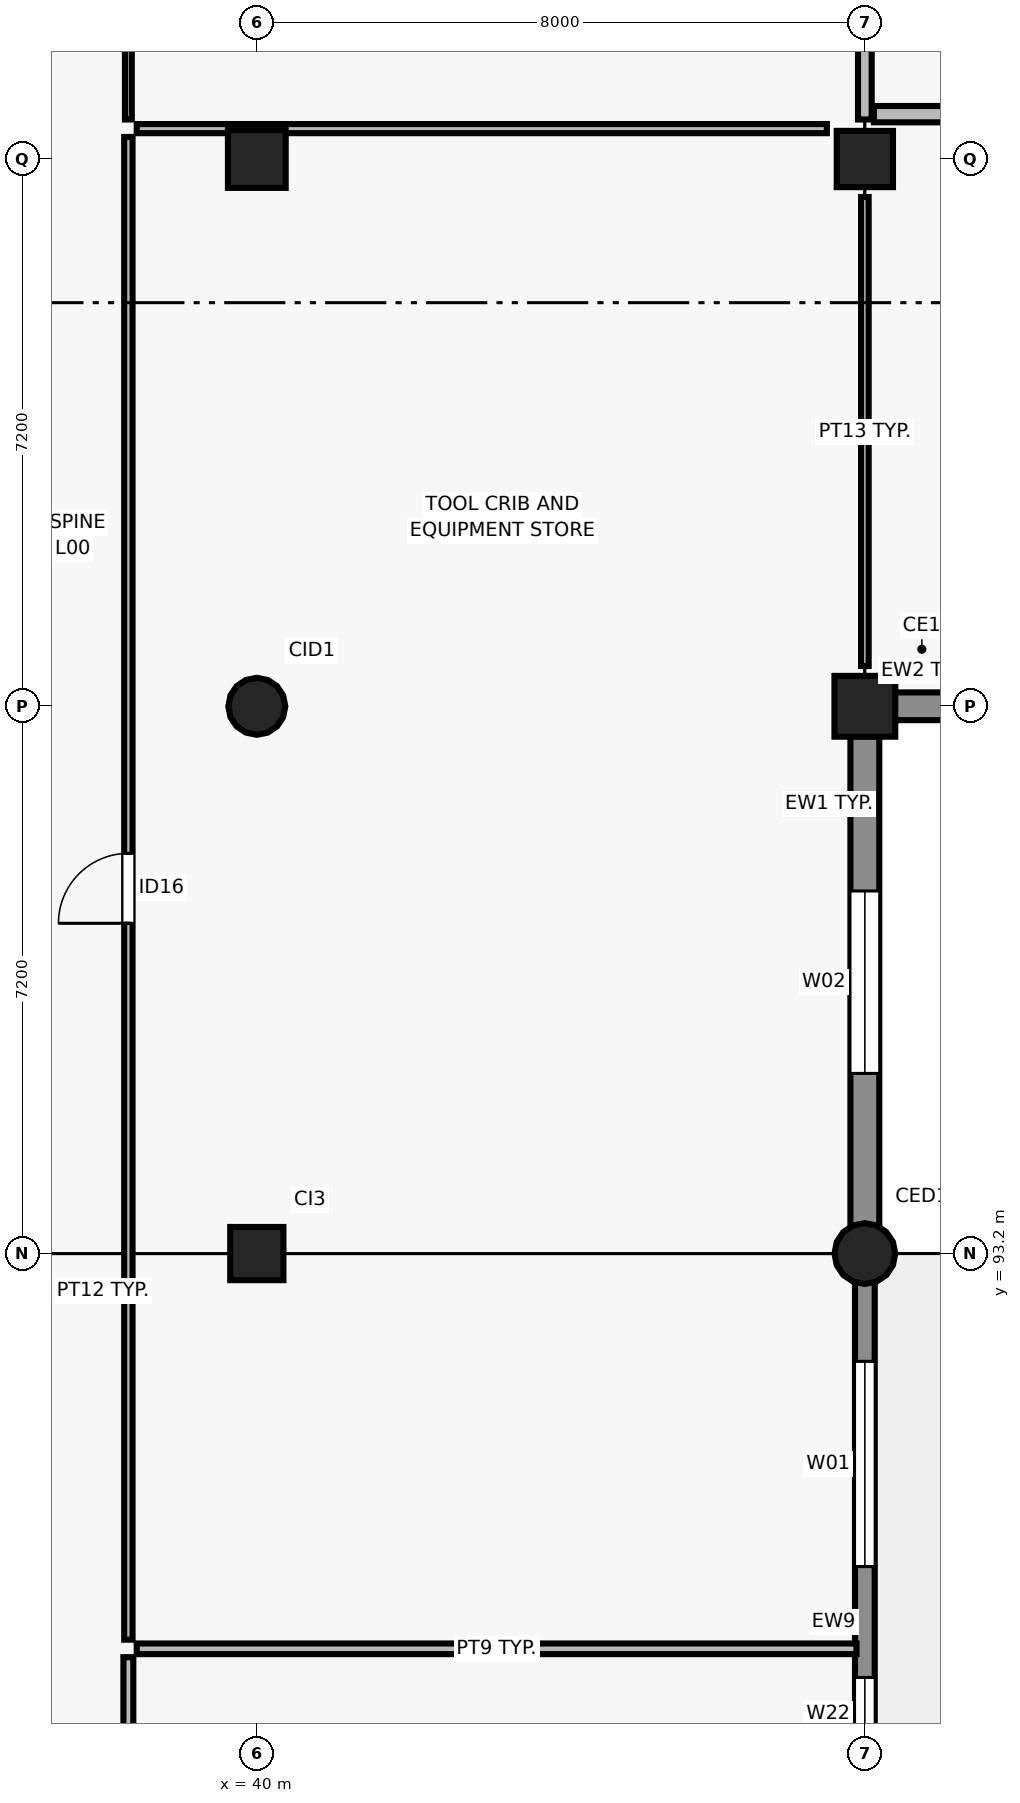
"""IFC4 building model, lengths in metres.
Left out: names, types, materials, properties, quantities, classifications, styles, units other than length and angle.
Written with IfcOpenShell. Run it as: python <this file> out.ifc"""

import sys

from ifc_helpers import new_model, si_unit, direction, frame, frame_2d, origin, origin_2d, place, context, subcontext, project, spatial, rectangle, circle, extrude, element, fill, save


model = new_model("IFC4")
c1 = context("Model", 3, precision=1e-05, world=origin(), true_north=direction((0.0, 1.0)))
c2 = subcontext(c1, "Body", "Model", "MODEL_VIEW")
j1 = project(units=[si_unit("LENGTHUNIT", "METRE"), si_unit("PLANEANGLEUNIT", "RADIAN")], contexts=[c1])
p1 = place(None, origin())
s1 = spatial("IfcSite", under=j1, at=p1, CompositionType="ELEMENT")
p2 = place(p1, origin())
s2 = spatial("IfcBuilding", under=s1, at=p2, CompositionType="ELEMENT")
p3 = place(p2, origin())
s3 = spatial("IfcBuildingStorey", under=s2, at=p3, CompositionType="ELEMENT", Elevation=0.0)
p4 = place(p3, frame((40.0, 93.2, 0.0), z_axis=(0.0, 0.0, 1.0), x_axis=(1.0, 0.0, 0.0)))
e1 = element("IfcColumn", 1, at=p4, inside=s3, PredefinedType="COLUMN", context=c2, shape_type="SweptSolid", body=[
    extrude(rectangle(XDim=0.7, YDim=0.7, at=origin_2d()), origin(), (0.0, 0.0, 1.0), 4.5),
])
p5 = place(p3, frame((40.0, 100.4, 0.0), z_axis=(0.0, 0.0, 1.0), x_axis=(1.0, 0.0, 0.0)))
e2 = element("IfcColumn", 2, at=p5, inside=s3, PredefinedType="COLUMN", context=c2, shape_type="SweptSolid", body=[
    extrude(circle(Radius=0.375, at=origin_2d()), origin(), (0.0, 0.0, 1.0), 4.5),
])
p6 = place(p3, frame((40.0, 107.6, 0.0), z_axis=(0.0, 0.0, 1.0), x_axis=(1.0, 0.0, 0.0)))
e3 = element("IfcColumn", 3, at=p6, inside=s3, PredefinedType="COLUMN", context=c2, shape_type="SweptSolid", body=[
    extrude(rectangle(XDim=0.76, YDim=0.76, at=origin_2d()), origin(), (0.0, 0.0, 1.0), 4.5),
])
p7 = place(p3, frame((48.0, 93.2, 0.0), z_axis=(0.0, 0.0, 1.0), x_axis=(1.0, 0.0, 0.0)))
e4 = element("IfcColumn", 4, at=p7, inside=s3, PredefinedType="COLUMN", context=c2, shape_type="SweptSolid", body=[
    extrude(circle(Radius=0.4, at=origin_2d()), origin(), (0.0, 0.0, 1.0), 4.5),
])
p8 = place(p3, frame((48.0, 100.4, 0.0), z_axis=(0.0, 0.0, 1.0), x_axis=(1.0, 0.0, 0.0)))
e5 = element("IfcColumn", 5, at=p8, inside=s3, PredefinedType="COLUMN", context=c2, shape_type="SweptSolid", body=[
    extrude(rectangle(XDim=0.8, YDim=0.8, at=origin_2d()), origin(), (0.0, 0.0, 1.0), 4.5),
])
p9 = place(p3, frame((48.0, 107.6, 0.0), z_axis=(0.0, 0.0, 1.0), x_axis=(1.0, 0.0, 0.0)))
e6 = element("IfcColumn", 6, at=p9, inside=s3, PredefinedType="COLUMN", context=c2, shape_type="SweptSolid", body=[
    extrude(rectangle(XDim=0.74, YDim=0.74, at=origin_2d()), origin(), (0.0, 0.0, 1.0), 4.5),
])
p10 = place(p3, frame((48.0, 86.295, 0.0), z_axis=(0.0, 0.0, 1.0), x_axis=(0.0, 1.0, 0.0)))
e7 = element("IfcWall", 7, at=p10, inside=s3, PredefinedType="SOLIDWALL", context=c2, shape_type="SweptSolid", body=[
    extrude(rectangle(XDim=6.569, YDim=0.26, at=frame_2d((3.285, 0.0))), origin(), (0.0, 0.0, 1.0), 3.6),
])
p11 = place(p10, frame((0.378, 0.0, 0.9)))
e8 = element("IfcOpeningElement", 8, at=p11, cuts=e7, PredefinedType="OPENING", context=c2, shape_type="SweptSolid", body=[
    extrude(rectangle(XDim=0.95, YDim=1.25, at=frame_2d((0.475, 0.625))), frame((0.0, 0.14, 0.0), z_axis=(0.0, -1.0, 0.0), x_axis=(1.0, 0.0, 0.0)), (0.0, 0.0, 1.0), 0.28),
])
p12 = place(p10, frame((2.787, 0.0, 0.9)))
e9 = element("IfcOpeningElement", 9, at=p12, cuts=e7, PredefinedType="OPENING", context=c2, shape_type="SweptSolid", body=[
    extrude(rectangle(XDim=2.7, YDim=1.8, at=frame_2d((1.35, 0.9))), frame((0.0, 0.14, 0.0), z_axis=(0.0, -1.0, 0.0), x_axis=(1.0, 0.0, 0.0)), (0.0, 0.0, 1.0), 0.28),
])
p13 = place(p3, frame((48.0, 93.536, 0.0), z_axis=(0.0, 0.0, 1.0), x_axis=(0.0, 1.0, 0.0)))
e10 = element("IfcWall", 10, at=p13, inside=s3, PredefinedType="SOLIDWALL", context=c2, shape_type="SweptSolid", body=[
    extrude(rectangle(XDim=6.469, YDim=0.38, at=frame_2d((3.234, 0.0))), origin(), (0.0, 0.0, 1.0), 3.64),
])
p14 = place(p13, frame((2.034, 0.0, 0.9)))
e11 = element("IfcOpeningElement", 11, at=p14, cuts=e10, PredefinedType="OPENING", context=c2, shape_type="SweptSolid", body=[
    extrude(rectangle(XDim=2.4, YDim=1.8, at=frame_2d((1.2, 0.9))), frame((0.0, 0.2, 0.0), z_axis=(0.0, -1.0, 0.0), x_axis=(1.0, 0.0, 0.0)), (0.0, 0.0, 1.0), 0.4),
])
p15 = place(p3, frame((48.395, 100.4, 0.0), z_axis=(0.0, 0.0, 1.0), x_axis=(1.0, 0.0, 0.0)))
e12 = element("IfcWall", 12, at=p15, inside=s3, PredefinedType="SOLIDWALL", context=c2, shape_type="SweptSolid", body=[
    extrude(rectangle(XDim=7.21, YDim=0.365, at=frame_2d((3.605, 0.0))), origin(), (0.0, 0.0, 1.0), 3.54),
])
p16 = place(p15, frame((1.043, 0.0, 0.9)))
e13 = element("IfcOpeningElement", 13, at=p16, cuts=e12, PredefinedType="OPENING", context=c2, shape_type="SweptSolid", body=[
    extrude(rectangle(XDim=2.2, YDim=1.8, at=frame_2d((1.1, 0.9))), frame((0.0, 0.192, 0.0), z_axis=(0.0, -1.0, 0.0), x_axis=(1.0, 0.0, 0.0)), (0.0, 0.0, 1.0), 0.385),
])
p17 = place(p15, frame((3.967, 0.0, 0.9)))
e14 = element("IfcOpeningElement", 14, at=p17, cuts=e12, PredefinedType="OPENING", context=c2, shape_type="SweptSolid", body=[
    extrude(rectangle(XDim=2.2, YDim=1.8, at=frame_2d((1.1, 0.9))), frame((0.0, 0.192, 0.0), z_axis=(0.0, -1.0, 0.0), x_axis=(1.0, 0.0, 0.0)), (0.0, 0.0, 1.0), 0.385),
])
p18 = place(p3, frame((38.42, 88.0, 0.0), z_axis=(0.0, 0.0, 1.0), x_axis=(1.0, 0.0, 0.0)))
e15 = element("IfcWall", 15, at=p18, inside=s3, PredefinedType="PARTITIONING", context=c2, shape_type="SweptSolid", body=[
    extrude(rectangle(XDim=9.47, YDim=0.14, at=frame_2d((4.735, 0.0))), origin(), (0.0, 0.0, 1.0), 4.2),
])
p19 = place(p3, frame((38.31, 68.12, 0.0), z_axis=(0.0, 0.0, 1.0), x_axis=(0.0, 1.0, 0.0)))
e16 = element("IfcWall", 16, at=p19, inside=s3, PredefinedType="PARTITIONING", context=c2, shape_type="SweptSolid", body=[
    extrude(rectangle(XDim=19.77, YDim=0.13, at=frame_2d((9.885, 0.0))), origin(), (0.0, 0.0, 1.0), 4.2),
])
p20 = place(p19, frame((9.06, 0.0, 0.0)))
e17 = element("IfcOpeningElement", 17, at=p20, cuts=e16, PredefinedType="OPENING", context=c2, shape_type="SweptSolid", body=[
    extrude(rectangle(XDim=1.65, YDim=2.3, at=frame_2d((0.825, 1.15))), frame((0.0, 0.075, 0.0), z_axis=(0.0, -1.0, 0.0), x_axis=(1.0, 0.0, 0.0)), (0.0, 0.0, 1.0), 0.15),
])
p21 = place(p3, frame((38.42, 108.0, 0.0), z_axis=(0.0, 0.0, 1.0), x_axis=(1.0, 0.0, 0.0)))
e18 = element("IfcWall", 18, at=p21, inside=s3, PredefinedType="PARTITIONING", context=c2, shape_type="SweptSolid", body=[
    extrude(rectangle(XDim=9.08, YDim=0.12, at=frame_2d((4.54, 0.0))), origin(), (0.0, 0.0, 1.0), 4.2),
])
p22 = place(p3, frame((38.31, 88.12, 0.0), z_axis=(0.0, 0.0, 1.0), x_axis=(0.0, 1.0, 0.0)))
e19 = element("IfcWall", 19, at=p22, inside=s3, PredefinedType="PARTITIONING", context=c2, shape_type="SweptSolid", body=[
    extrude(rectangle(XDim=19.77, YDim=0.11, at=frame_2d((9.885, 0.0))), origin(), (0.0, 0.0, 1.0), 4.2),
])
p23 = place(p22, frame((9.425, 0.0, 0.0)))
e20 = element("IfcOpeningElement", 20, at=p23, cuts=e19, PredefinedType="OPENING", context=c2, shape_type="SweptSolid", body=[
    extrude(rectangle(XDim=0.92, YDim=2.1, at=frame_2d((0.46, 1.05))), frame((0.0, 0.065, 0.0), z_axis=(0.0, -1.0, 0.0), x_axis=(1.0, 0.0, 0.0)), (0.0, 0.0, 1.0), 0.13),
])
p24 = place(p3, frame((48.0, 100.93, 0.0), z_axis=(0.0, 0.0, 1.0), x_axis=(0.0, 1.0, 0.0)))
e21 = element("IfcWall", 21, at=p24, inside=s3, PredefinedType="PARTITIONING", context=c2, shape_type="SweptSolid", body=[
    extrude(rectangle(XDim=6.17, YDim=0.1, at=frame_2d((3.085, 0.0))), origin(), (0.0, 0.0, 1.0), 3.74),
])
p25 = place(p3, frame((38.31, 108.12, 0.0), z_axis=(0.0, 0.0, 1.0), x_axis=(0.0, 1.0, 0.0)))
e22 = element("IfcWall", 22, at=p25, inside=s3, PredefinedType="PARTITIONING", context=c2, shape_type="SweptSolid", body=[
    extrude(rectangle(XDim=13.77, YDim=0.09, at=frame_2d((6.885, 0.0))), origin(), (0.0, 0.0, 1.0), 4.2),
])
p26 = place(p25, frame((6.06, 0.0, 0.0)))
e23 = element("IfcOpeningElement", 23, at=p26, cuts=e22, PredefinedType="OPENING", context=c2, shape_type="SweptSolid", body=[
    extrude(rectangle(XDim=1.65, YDim=2.3, at=frame_2d((0.825, 1.15))), frame((0.0, 0.055, 0.0), z_axis=(0.0, -1.0, 0.0), x_axis=(1.0, 0.0, 0.0)), (0.0, 0.0, 1.0), 0.11),
])
p27 = place(p3, frame((48.0, 108.12, 0.0), z_axis=(0.0, 0.0, 1.0), x_axis=(0.0, 1.0, 0.0)))
e24 = element("IfcWall", 24, at=p27, inside=s3, PredefinedType="PARTITIONING", context=c2, shape_type="SweptSolid", body=[
    extrude(rectangle(XDim=6.2, YDim=0.18, at=frame_2d((3.1, 0.0))), origin(), (0.0, 0.0, 1.0), 3.77),
])
p28 = place(p3, frame((48.119, 108.19, 0.0), z_axis=(0.0, 0.0, 1.0), x_axis=(1.0, 0.0, 0.0)))
e25 = element("IfcWall", 25, at=p28, inside=s3, PredefinedType="PARTITIONING", context=c2, shape_type="SweptSolid", body=[
    extrude(rectangle(XDim=27.771, YDim=0.215, at=frame_2d((13.885, 0.0))), origin(), (0.0, 0.0, 1.0), 4.2),
])
p29 = place(p28, frame((13.245, 0.0, 0.0)))
e26 = element("IfcOpeningElement", 26, at=p29, cuts=e25, PredefinedType="OPENING", context=c2, shape_type="SweptSolid", body=[
    extrude(rectangle(XDim=1.28, YDim=2.2, at=frame_2d((0.64, 1.1))), frame((0.0, 0.117, 0.0), z_axis=(0.0, -1.0, 0.0), x_axis=(1.0, 0.0, 0.0)), (0.0, 0.0, 1.0), 0.235),
])
p30 = place(p11, origin())
e27 = element("IfcWindow", 27, at=p30, inside=s3, PartitioningType="SINGLE_PANEL", PredefinedType="WINDOW", context=c2, shape_type="SweptSolid", body=[
    extrude(rectangle(XDim=0.95, YDim=1.25, at=frame_2d((0.475, 0.625))), frame((0.0, 0.03, 0.0), z_axis=(0.0, -1.0, 0.0), x_axis=(1.0, 0.0, 0.0)), (0.0, 0.0, 1.0), 0.06),
])
fill(e8, e27)
p31 = place(p12, origin())
e28 = element("IfcWindow", 28, at=p31, inside=s3, PartitioningType="SINGLE_PANEL", PredefinedType="WINDOW", context=c2, shape_type="SweptSolid", body=[
    extrude(rectangle(XDim=2.7, YDim=1.8, at=frame_2d((1.35, 0.9))), frame((0.0, 0.03, 0.0), z_axis=(0.0, -1.0, 0.0), x_axis=(1.0, 0.0, 0.0)), (0.0, 0.0, 1.0), 0.06),
])
fill(e9, e28)
p32 = place(p14, origin())
e29 = element("IfcWindow", 29, at=p32, inside=s3, PartitioningType="SINGLE_PANEL", PredefinedType="WINDOW", context=c2, shape_type="SweptSolid", body=[
    extrude(rectangle(XDim=2.4, YDim=1.8, at=frame_2d((1.2, 0.9))), frame((0.0, 0.03, 0.0), z_axis=(0.0, -1.0, 0.0), x_axis=(1.0, 0.0, 0.0)), (0.0, 0.0, 1.0), 0.06),
])
fill(e11, e29)
p33 = place(p23, origin())
e30 = element("IfcDoor", 30, at=p33, inside=s3, OperationType="SINGLE_SWING_LEFT", PredefinedType="DOOR", context=c2, shape_type="SweptSolid", body=[
    extrude(rectangle(XDim=0.92, YDim=2.1, at=frame_2d((0.46, 1.05))), frame((0.0, 0.025, 0.0), z_axis=(0.0, -1.0, 0.0), x_axis=(1.0, 0.0, 0.0)), (0.0, 0.0, 1.0), 0.05),
])
fill(e20, e30)
save(model, sys.argv[1])
